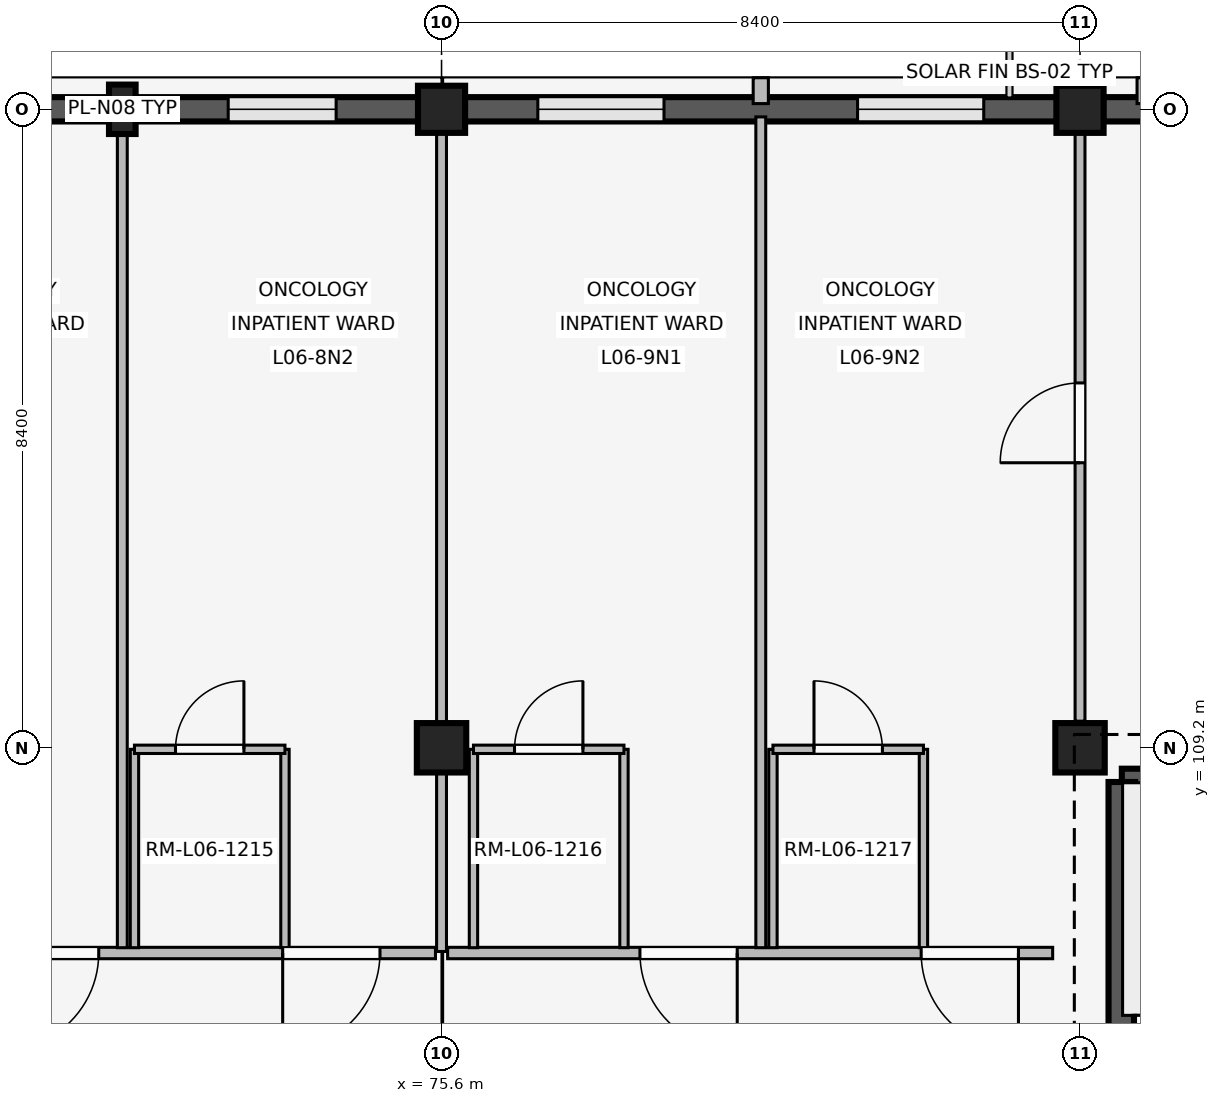
"""IFC4 building model, lengths in metres.
Left out: names, types, materials, properties, quantities, classifications, styles, units other than length and angle.
Written with IfcOpenShell. Run it as: python <this file> out.ifc"""

import sys

from ifc_helpers import new_model, si_unit, direction, frame, frame_2d, origin, origin_2d, place, context, subcontext, project, spatial, rectangle, extrude, element, fill, save


model = new_model("IFC4")
c1 = context("Model", 3, precision=1e-05, world=origin(), true_north=direction((0.0, 1.0)))
c2 = subcontext(c1, "Body", "Model", "MODEL_VIEW")
j1 = project(units=[si_unit("LENGTHUNIT", "METRE"), si_unit("PLANEANGLEUNIT", "RADIAN")], contexts=[c1])
p1 = place(None, origin())
s1 = spatial("IfcSite", under=j1, at=p1, CompositionType="ELEMENT")
p2 = place(p1, origin())
s2 = spatial("IfcBuilding", under=s1, at=p2, CompositionType="ELEMENT")
p3 = place(p2, frame((0.0, 0.0, 24.6)))
s3 = spatial("IfcBuildingStorey", under=s2, at=p3, CompositionType="ELEMENT", Elevation=24.6)
p4 = place(p3, frame((75.6, 109.2, 0.0), z_axis=(0.0, 0.0, 1.0), x_axis=(1.0, 0.0, 0.0)))
e1 = element("IfcColumn", 1, at=p4, inside=s3, PredefinedType="COLUMN", context=c2, shape_type="SweptSolid", body=[
    extrude(rectangle(XDim=0.65, YDim=0.65, at=origin_2d()), origin(), (0.0, 0.0, 1.0), 4.2),
])
p5 = place(p3, frame((75.6, 117.6, 0.0), z_axis=(0.0, 0.0, 1.0), x_axis=(1.0, 0.0, 0.0)))
e2 = element("IfcColumn", 2, at=p5, inside=s3, PredefinedType="COLUMN", context=c2, shape_type="SweptSolid", body=[
    extrude(rectangle(XDim=0.62, YDim=0.62, at=origin_2d()), origin(), (0.0, 0.0, 1.0), 4.2),
])
p6 = place(p3, frame((84.0, 109.2, 0.0), z_axis=(0.0, 0.0, 1.0), x_axis=(1.0, 0.0, 0.0)))
e3 = element("IfcColumn", 3, at=p6, inside=s3, PredefinedType="COLUMN", context=c2, shape_type="SweptSolid", body=[
    extrude(rectangle(XDim=0.65, YDim=0.65, at=origin_2d()), origin(), (0.0, 0.0, 1.0), 4.2),
])
p7 = place(p3, frame((84.0, 117.6, 0.0), z_axis=(0.0, 0.0, 1.0), x_axis=(1.0, 0.0, 0.0)))
e4 = element("IfcColumn", 4, at=p7, inside=s3, PredefinedType="COLUMN", context=c2, shape_type="SweptSolid", body=[
    extrude(rectangle(XDim=0.62, YDim=0.62, at=origin_2d()), origin(), (0.0, 0.0, 1.0), 4.2),
])
p8 = place(p3, frame((71.4, 117.6, 0.0), z_axis=(0.0, 0.0, 1.0), x_axis=(1.0, 0.0, 0.0)))
e5 = element("IfcColumn", 5, at=p8, inside=s3, PredefinedType="PILASTER", context=c2, shape_type="SweptSolid", body=[
    extrude(rectangle(XDim=0.35, YDim=0.65, at=origin_2d()), origin(), (0.0, 0.0, 1.0), 4.2),
])
p9 = place(p3, frame((67.505, 117.6, 0.0), z_axis=(0.0, 0.0, 1.0), x_axis=(1.0, 0.0, 0.0)))
e6 = element("IfcWall", 6, at=p9, inside=s3, PredefinedType="SOLIDWALL", context=c2, shape_type="SweptSolid", body=[
    extrude(rectangle(XDim=7.79, YDim=0.32, at=frame_2d((3.895, 0.0))), origin(), (0.0, 0.0, 1.0), 3.34),
])
p10 = place(p9, frame((1.082, 0.0, 0.85)))
e7 = element("IfcOpeningElement", 7, at=p10, cuts=e6, PredefinedType="OPENING", context=c2, shape_type="SweptSolid", body=[
    extrude(rectangle(XDim=1.42, YDim=1.45, at=frame_2d((0.71, 0.725))), frame((0.0, 0.17, 0.0), z_axis=(0.0, -1.0, 0.0), x_axis=(1.0, 0.0, 0.0)), (0.0, 0.0, 1.0), 0.34),
])
p11 = place(p9, frame((5.288, 0.0, 0.85)))
e8 = element("IfcOpeningElement", 8, at=p11, cuts=e6, PredefinedType="OPENING", context=c2, shape_type="SweptSolid", body=[
    extrude(rectangle(XDim=1.42, YDim=1.45, at=frame_2d((0.71, 0.725))), frame((0.0, 0.17, 0.0), z_axis=(0.0, -1.0, 0.0), x_axis=(1.0, 0.0, 0.0)), (0.0, 0.0, 1.0), 0.34),
])
p12 = place(p3, frame((75.905, 117.6, 0.0), z_axis=(0.0, 0.0, 1.0), x_axis=(1.0, 0.0, 0.0)))
e9 = element("IfcWall", 9, at=p12, inside=s3, PredefinedType="SOLIDWALL", context=c2, shape_type="SweptSolid", body=[
    extrude(rectangle(XDim=7.79, YDim=0.32, at=frame_2d((3.895, 0.0))), origin(), (0.0, 0.0, 1.0), 3.34),
])
p13 = place(p12, frame((0.962, 0.0, 0.85)))
e10 = element("IfcOpeningElement", 10, at=p13, cuts=e9, PredefinedType="OPENING", context=c2, shape_type="SweptSolid", body=[
    extrude(rectangle(XDim=1.66, YDim=1.95, at=frame_2d((0.83, 0.975))), frame((0.0, 0.17, 0.0), z_axis=(0.0, -1.0, 0.0), x_axis=(1.0, 0.0, 0.0)), (0.0, 0.0, 1.0), 0.34),
])
p14 = place(p12, frame((5.168, 0.0, 0.85)))
e11 = element("IfcOpeningElement", 11, at=p14, cuts=e9, PredefinedType="OPENING", context=c2, shape_type="SweptSolid", body=[
    extrude(rectangle(XDim=1.66, YDim=1.95, at=frame_2d((0.83, 0.975))), frame((0.0, 0.17, 0.0), z_axis=(0.0, -1.0, 0.0), x_axis=(1.0, 0.0, 0.0)), (0.0, 0.0, 1.0), 0.34),
])
p15 = place(p3, frame((79.8, 117.675, 0.0), z_axis=(0.0, 0.0, 1.0), x_axis=(0.0, 1.0, 0.0)))
e12 = element("IfcWall", 12, at=p15, inside=s3, PredefinedType="ELEMENTEDWALL", context=c2, shape_type="SweptSolid", body=[
    extrude(rectangle(XDim=0.34, YDim=0.2, at=frame_2d((0.17, 0.0))), origin(), (0.0, 0.0, 1.0), 3.32),
])
p16 = place(p3, frame((84.305, 117.6, 0.0), z_axis=(0.0, 0.0, 1.0), x_axis=(1.0, 0.0, 0.0)))
e13 = element("IfcWall", 13, at=p16, inside=s3, PredefinedType="SOLIDWALL", context=c2, shape_type="SweptSolid", body=[
    extrude(rectangle(XDim=7.79, YDim=0.32, at=frame_2d((3.895, 0.0))), origin(), (0.0, 0.0, 1.0), 3.34),
])
p17 = place(p16, frame((1.022, 0.0, 0.85)))
e14 = element("IfcOpeningElement", 14, at=p17, cuts=e13, PredefinedType="OPENING", context=c2, shape_type="SweptSolid", body=[
    extrude(rectangle(XDim=1.54, YDim=1.85, at=frame_2d((0.77, 0.925))), frame((0.0, 0.17, 0.0), z_axis=(0.0, -1.0, 0.0), x_axis=(1.0, 0.0, 0.0)), (0.0, 0.0, 1.0), 0.34),
])
p18 = place(p16, frame((5.228, 0.0, 0.85)))
e15 = element("IfcOpeningElement", 15, at=p18, cuts=e13, PredefinedType="OPENING", context=c2, shape_type="SweptSolid", body=[
    extrude(rectangle(XDim=1.54, YDim=1.85, at=frame_2d((0.77, 0.925))), frame((0.0, 0.17, 0.0), z_axis=(0.0, -1.0, 0.0), x_axis=(1.0, 0.0, 0.0)), (0.0, 0.0, 1.0), 0.34),
])
p19 = place(p3, frame((84.85, 117.675, 0.0), z_axis=(0.0, 0.0, 1.0), x_axis=(0.0, 1.0, 0.0)))
e16 = element("IfcWall", 16, at=p19, inside=s3, PredefinedType="ELEMENTEDWALL", context=c2, shape_type="SweptSolid", body=[
    extrude(rectangle(XDim=0.34, YDim=0.2, at=frame_2d((0.17, 0.0))), origin(), (0.0, 0.0, 1.0), 3.32),
])
p20 = place(p3, frame((84.55, 108.75, 0.0), z_axis=(0.0, 0.0, 1.0), x_axis=(1.0, 0.0, 0.0)))
e17 = element("IfcWall", 17, at=p20, inside=s3, PredefinedType="SHEAR", context=c2, shape_type="SweptSolid", body=[
    extrude(rectangle(XDim=7.5, YDim=0.35, at=frame_2d((3.75, 0.0))), origin(), (0.0, 0.0, 1.0), 3.92),
])
p21 = place(p3, frame((84.55, 101.2, 0.0), z_axis=(0.0, 0.0, 1.0), x_axis=(0.0, 1.0, 0.0)))
e18 = element("IfcWall", 18, at=p21, inside=s3, PredefinedType="SHEAR", context=c2, shape_type="SweptSolid", body=[
    extrude(rectangle(XDim=7.55, YDim=0.35, at=frame_2d((3.775, 0.0))), origin(), (0.0, 0.0, 1.0), 3.92),
])
p22 = place(p21, frame((0.28, 0.0, 0.0)))
e19 = element("IfcOpeningElement", 19, at=p22, cuts=e18, PredefinedType="OPENING", context=c2, shape_type="SweptSolid", body=[
    extrude(rectangle(XDim=1.0, YDim=2.15, at=frame_2d((0.5, 1.075))), frame((0.0, 0.185, 0.0), z_axis=(0.0, -1.0, 0.0), x_axis=(1.0, 0.0, 0.0)), (0.0, 0.0, 1.0), 0.37),
])
p23 = place(p3, frame((75.52, 106.5, 0.0), z_axis=(0.0, 0.0, 1.0), x_axis=(-1.0, 0.0, 0.0)))
e20 = element("IfcWall", 20, at=p23, inside=s3, PredefinedType="PARTITIONING", context=c2, shape_type="SweptSolid", body=[
    extrude(rectangle(XDim=8.24, YDim=0.15, at=frame_2d((4.12, 0.0))), origin(), (0.0, 0.0, 1.0), 3.32),
])
p24 = place(p23, frame((0.73, 0.0, 0.0)))
e21 = element("IfcOpeningElement", 21, at=p24, cuts=e20, PredefinedType="OPENING", context=c2, shape_type="SweptSolid", body=[
    extrude(rectangle(XDim=1.28, YDim=2.2, at=frame_2d((0.64, 1.1))), frame((0.0, 0.085, 0.0), z_axis=(0.0, -1.0, 0.0), x_axis=(1.0, 0.0, 0.0)), (0.0, 0.0, 1.0), 0.17),
])
p25 = place(p23, frame((4.43, 0.0, 0.0)))
e22 = element("IfcOpeningElement", 22, at=p25, cuts=e20, PredefinedType="OPENING", context=c2, shape_type="SweptSolid", body=[
    extrude(rectangle(XDim=1.28, YDim=2.2, at=frame_2d((0.64, 1.1))), frame((0.0, 0.085, 0.0), z_axis=(0.0, -1.0, 0.0), x_axis=(1.0, 0.0, 0.0)), (0.0, 0.0, 1.0), 0.17),
])
p26 = place(p3, frame((71.4, 106.57, 0.0), z_axis=(0.0, 0.0, 1.0), x_axis=(0.0, 1.0, 0.0)))
e23 = element("IfcWall", 23, at=p26, inside=s3, PredefinedType="PARTITIONING", context=c2, shape_type="SweptSolid", body=[
    extrude(rectangle(XDim=10.93, YDim=0.13, at=frame_2d((5.465, 0.0))), origin(), (0.0, 0.0, 1.0), 3.32),
])
for number, where, z_axis, x_axis in (
    (24, (71.56, 106.57, 0.0), (0.0, 0.0, 1.0), (0.0, 1.0, 0.0)),
    (25, (73.54, 106.57, 0.0), (0.0, 0.0, 1.0), (0.0, 1.0, 0.0)),
):
    element("IfcWall", number, at=place(p3, frame(where, z_axis=z_axis, x_axis=x_axis)), inside=s3, PredefinedType="PARTITIONING", context=c2, shape_type="SweptSolid", body=[
        extrude(rectangle(XDim=2.61, YDim=0.11, at=frame_2d((1.305, 0.0))), origin(), (0.0, 0.0, 1.0), 3.32),
    ])
p27 = place(p3, frame((71.56, 109.18, 0.0), z_axis=(0.0, 0.0, 1.0), x_axis=(1.0, 0.0, 0.0)))
e26 = element("IfcWall", 26, at=p27, inside=s3, PredefinedType="PARTITIONING", context=c2, shape_type="SweptSolid", body=[
    extrude(rectangle(XDim=1.98, YDim=0.11, at=frame_2d((0.99, 0.0))), origin(), (0.0, 0.0, 1.0), 3.32),
])
p28 = place(p27, frame((0.54, 0.0, 0.0)))
e27 = element("IfcOpeningElement", 27, at=p28, cuts=e26, PredefinedType="OPENING", context=c2, shape_type="SweptSolid", body=[
    extrude(rectangle(XDim=0.9, YDim=2.1, at=frame_2d((0.45, 1.05))), frame((0.0, 0.065, 0.0), z_axis=(0.0, -1.0, 0.0), x_axis=(1.0, 0.0, 0.0)), (0.0, 0.0, 1.0), 0.13),
])
p29 = place(p3, frame((75.6, 106.52, 0.0), z_axis=(0.0, 0.0, 1.0), x_axis=(0.0, 1.0, 0.0)))
e28 = element("IfcWall", 28, at=p29, inside=s3, PredefinedType="PARTITIONING", context=c2, shape_type="SweptSolid", body=[
    extrude(rectangle(XDim=10.94, YDim=0.13, at=frame_2d((5.47, 0.0))), origin(), (0.0, 0.0, 1.0), 3.32),
])
p30 = place(p3, frame((83.64, 106.5, 0.0), z_axis=(0.0, 0.0, 1.0), x_axis=(-1.0, 0.0, 0.0)))
e29 = element("IfcWall", 29, at=p30, inside=s3, PredefinedType="PARTITIONING", context=c2, shape_type="SweptSolid", body=[
    extrude(rectangle(XDim=7.96, YDim=0.15, at=frame_2d((3.98, 0.0))), origin(), (0.0, 0.0, 1.0), 3.32),
])
p31 = place(p30, frame((0.45, 0.0, 0.0)))
e30 = element("IfcOpeningElement", 30, at=p31, cuts=e29, PredefinedType="OPENING", context=c2, shape_type="SweptSolid", body=[
    extrude(rectangle(XDim=1.28, YDim=2.2, at=frame_2d((0.64, 1.1))), frame((0.0, 0.085, 0.0), z_axis=(0.0, -1.0, 0.0), x_axis=(1.0, 0.0, 0.0)), (0.0, 0.0, 1.0), 0.17),
])
p32 = place(p30, frame((4.15, 0.0, 0.0)))
e31 = element("IfcOpeningElement", 31, at=p32, cuts=e29, PredefinedType="OPENING", context=c2, shape_type="SweptSolid", body=[
    extrude(rectangle(XDim=1.28, YDim=2.2, at=frame_2d((0.64, 1.1))), frame((0.0, 0.085, 0.0), z_axis=(0.0, -1.0, 0.0), x_axis=(1.0, 0.0, 0.0)), (0.0, 0.0, 1.0), 0.17),
])
p33 = place(p3, frame((79.8, 106.57, 0.0), z_axis=(0.0, 0.0, 1.0), x_axis=(0.0, 1.0, 0.0)))
e32 = element("IfcWall", 32, at=p33, inside=s3, PredefinedType="PARTITIONING", context=c2, shape_type="SweptSolid", body=[
    extrude(rectangle(XDim=10.93, YDim=0.13, at=frame_2d((5.465, 0.0))), origin(), (0.0, 0.0, 1.0), 3.32),
])
for number, where, z_axis, x_axis in (
    (33, (76.02, 106.57, 0.0), (0.0, 0.0, 1.0), (0.0, 1.0, 0.0)),
    (34, (78.0, 106.57, 0.0), (0.0, 0.0, 1.0), (0.0, 1.0, 0.0)),
):
    element("IfcWall", number, at=place(p3, frame(where, z_axis=z_axis, x_axis=x_axis)), inside=s3, PredefinedType="PARTITIONING", context=c2, shape_type="SweptSolid", body=[
        extrude(rectangle(XDim=2.61, YDim=0.11, at=frame_2d((1.305, 0.0))), origin(), (0.0, 0.0, 1.0), 3.32),
    ])
p34 = place(p3, frame((76.02, 109.18, 0.0), z_axis=(0.0, 0.0, 1.0), x_axis=(1.0, 0.0, 0.0)))
e35 = element("IfcWall", 35, at=p34, inside=s3, PredefinedType="PARTITIONING", context=c2, shape_type="SweptSolid", body=[
    extrude(rectangle(XDim=1.98, YDim=0.11, at=frame_2d((0.99, 0.0))), origin(), (0.0, 0.0, 1.0), 3.32),
])
p35 = place(p34, frame((0.54, 0.0, 0.0)))
e36 = element("IfcOpeningElement", 36, at=p35, cuts=e35, PredefinedType="OPENING", context=c2, shape_type="SweptSolid", body=[
    extrude(rectangle(XDim=0.9, YDim=2.1, at=frame_2d((0.45, 1.05))), frame((0.0, 0.065, 0.0), z_axis=(0.0, -1.0, 0.0), x_axis=(1.0, 0.0, 0.0)), (0.0, 0.0, 1.0), 0.13),
])
for number, where, z_axis, x_axis in (
    (37, (79.96, 106.57, 0.0), (0.0, 0.0, 1.0), (0.0, 1.0, 0.0)),
    (38, (81.94, 106.57, 0.0), (0.0, 0.0, 1.0), (0.0, 1.0, 0.0)),
):
    element("IfcWall", number, at=place(p3, frame(where, z_axis=z_axis, x_axis=x_axis)), inside=s3, PredefinedType="PARTITIONING", context=c2, shape_type="SweptSolid", body=[
        extrude(rectangle(XDim=2.61, YDim=0.11, at=frame_2d((1.305, 0.0))), origin(), (0.0, 0.0, 1.0), 3.32),
    ])
p36 = place(p3, frame((79.96, 109.18, 0.0), z_axis=(0.0, 0.0, 1.0), x_axis=(1.0, 0.0, 0.0)))
e39 = element("IfcWall", 39, at=p36, inside=s3, PredefinedType="PARTITIONING", context=c2, shape_type="SweptSolid", body=[
    extrude(rectangle(XDim=1.98, YDim=0.11, at=frame_2d((0.99, 0.0))), origin(), (0.0, 0.0, 1.0), 3.32),
])
p37 = place(p36, frame((0.54, 0.0, 0.0)))
e40 = element("IfcOpeningElement", 40, at=p37, cuts=e39, PredefinedType="OPENING", context=c2, shape_type="SweptSolid", body=[
    extrude(rectangle(XDim=0.9, YDim=2.1, at=frame_2d((0.45, 1.05))), frame((0.0, 0.065, 0.0), z_axis=(0.0, -1.0, 0.0), x_axis=(1.0, 0.0, 0.0)), (0.0, 0.0, 1.0), 0.13),
])
p38 = place(p3, frame((84.0, 109.55, 0.0), z_axis=(0.0, 0.0, 1.0), x_axis=(0.0, 1.0, 0.0)))
e41 = element("IfcWall", 41, at=p38, inside=s3, PredefinedType="PARTITIONING", context=c2, shape_type="SweptSolid", body=[
    extrude(rectangle(XDim=7.91, YDim=0.13, at=frame_2d((3.955, 0.0))), origin(), (0.0, 0.0, 1.0), 3.32),
])
p39 = place(p38, frame((3.4, 0.0, 0.0)))
e42 = element("IfcOpeningElement", 42, at=p39, cuts=e41, PredefinedType="OPENING", context=c2, shape_type="SweptSolid", body=[
    extrude(rectangle(XDim=1.05, YDim=2.2, at=frame_2d((0.525, 1.1))), frame((0.0, 0.075, 0.0), z_axis=(0.0, -1.0, 0.0), x_axis=(1.0, 0.0, 0.0)), (0.0, 0.0, 1.0), 0.15),
])
p40 = place(p11, origin())
e43 = element("IfcWindow", 43, at=p40, inside=s3, PartitioningType="SINGLE_PANEL", PredefinedType="WINDOW", context=c2, shape_type="SweptSolid", body=[
    extrude(rectangle(XDim=1.42, YDim=1.45, at=frame_2d((0.71, 0.725))), frame((0.0, 0.03, 0.0), z_axis=(0.0, -1.0, 0.0), x_axis=(1.0, 0.0, 0.0)), (0.0, 0.0, 1.0), 0.06),
])
fill(e8, e43)
p41 = place(p13, origin())
e44 = element("IfcWindow", 44, at=p41, inside=s3, PartitioningType="SINGLE_PANEL", PredefinedType="WINDOW", context=c2, shape_type="SweptSolid", body=[
    extrude(rectangle(XDim=1.66, YDim=1.95, at=frame_2d((0.83, 0.975))), frame((0.0, 0.03, 0.0), z_axis=(0.0, -1.0, 0.0), x_axis=(1.0, 0.0, 0.0)), (0.0, 0.0, 1.0), 0.06),
])
fill(e10, e44)
p42 = place(p14, origin())
e45 = element("IfcWindow", 45, at=p42, inside=s3, PartitioningType="SINGLE_PANEL", PredefinedType="WINDOW", context=c2, shape_type="SweptSolid", body=[
    extrude(rectangle(XDim=1.66, YDim=1.95, at=frame_2d((0.83, 0.975))), frame((0.0, 0.03, 0.0), z_axis=(0.0, -1.0, 0.0), x_axis=(1.0, 0.0, 0.0)), (0.0, 0.0, 1.0), 0.06),
])
fill(e11, e45)
p43 = place(p24, origin())
e46 = element("IfcDoor", 46, at=p43, inside=s3, OperationType="SINGLE_SWING_RIGHT", PredefinedType="DOOR", context=c2, shape_type="SweptSolid", body=[
    extrude(rectangle(XDim=1.28, YDim=2.2, at=frame_2d((0.64, 1.1))), frame((0.0, 0.025, 0.0), z_axis=(0.0, -1.0, 0.0), x_axis=(1.0, 0.0, 0.0)), (0.0, 0.0, 1.0), 0.05),
])
fill(e21, e46)
p44 = place(p25, origin())
e47 = element("IfcDoor", 47, at=p44, inside=s3, OperationType="SINGLE_SWING_RIGHT", PredefinedType="DOOR", context=c2, shape_type="SweptSolid", body=[
    extrude(rectangle(XDim=1.28, YDim=2.2, at=frame_2d((0.64, 1.1))), frame((0.0, 0.025, 0.0), z_axis=(0.0, -1.0, 0.0), x_axis=(1.0, 0.0, 0.0)), (0.0, 0.0, 1.0), 0.05),
])
fill(e22, e47)
p45 = place(p28, origin())
e48 = element("IfcDoor", 48, at=p45, inside=s3, OperationType="SINGLE_SWING_RIGHT", PredefinedType="DOOR", context=c2, shape_type="SweptSolid", body=[
    extrude(rectangle(XDim=0.9, YDim=2.1, at=frame_2d((0.45, 1.05))), frame((0.0, 0.025, 0.0), z_axis=(0.0, -1.0, 0.0), x_axis=(1.0, 0.0, 0.0)), (0.0, 0.0, 1.0), 0.05),
])
fill(e27, e48)
p46 = place(p31, origin())
e49 = element("IfcDoor", 49, at=p46, inside=s3, OperationType="SINGLE_SWING_LEFT", PredefinedType="DOOR", context=c2, shape_type="SweptSolid", body=[
    extrude(rectangle(XDim=1.28, YDim=2.2, at=frame_2d((0.64, 1.1))), frame((0.0, 0.025, 0.0), z_axis=(0.0, -1.0, 0.0), x_axis=(1.0, 0.0, 0.0)), (0.0, 0.0, 1.0), 0.05),
])
fill(e30, e49)
p47 = place(p32, origin())
e50 = element("IfcDoor", 50, at=p47, inside=s3, OperationType="SINGLE_SWING_LEFT", PredefinedType="DOOR", context=c2, shape_type="SweptSolid", body=[
    extrude(rectangle(XDim=1.28, YDim=2.2, at=frame_2d((0.64, 1.1))), frame((0.0, 0.025, 0.0), z_axis=(0.0, -1.0, 0.0), x_axis=(1.0, 0.0, 0.0)), (0.0, 0.0, 1.0), 0.05),
])
fill(e31, e50)
p48 = place(p35, origin())
e51 = element("IfcDoor", 51, at=p48, inside=s3, OperationType="SINGLE_SWING_RIGHT", PredefinedType="DOOR", context=c2, shape_type="SweptSolid", body=[
    extrude(rectangle(XDim=0.9, YDim=2.1, at=frame_2d((0.45, 1.05))), frame((0.0, 0.025, 0.0), z_axis=(0.0, -1.0, 0.0), x_axis=(1.0, 0.0, 0.0)), (0.0, 0.0, 1.0), 0.05),
])
fill(e36, e51)
p49 = place(p37, origin())
e52 = element("IfcDoor", 52, at=p49, inside=s3, OperationType="SINGLE_SWING_LEFT", PredefinedType="DOOR", context=c2, shape_type="SweptSolid", body=[
    extrude(rectangle(XDim=0.9, YDim=2.1, at=frame_2d((0.45, 1.05))), frame((0.0, 0.025, 0.0), z_axis=(0.0, -1.0, 0.0), x_axis=(1.0, 0.0, 0.0)), (0.0, 0.0, 1.0), 0.05),
])
fill(e40, e52)
p50 = place(p39, origin())
e53 = element("IfcDoor", 53, at=p50, inside=s3, OperationType="SINGLE_SWING_LEFT", PredefinedType="DOOR", context=c2, shape_type="SweptSolid", body=[
    extrude(rectangle(XDim=1.05, YDim=2.2, at=frame_2d((0.525, 1.1))), frame((0.0, 0.025, 0.0), z_axis=(0.0, -1.0, 0.0), x_axis=(1.0, 0.0, 0.0)), (0.0, 0.0, 1.0), 0.05),
])
fill(e42, e53)
save(model, sys.argv[1])
